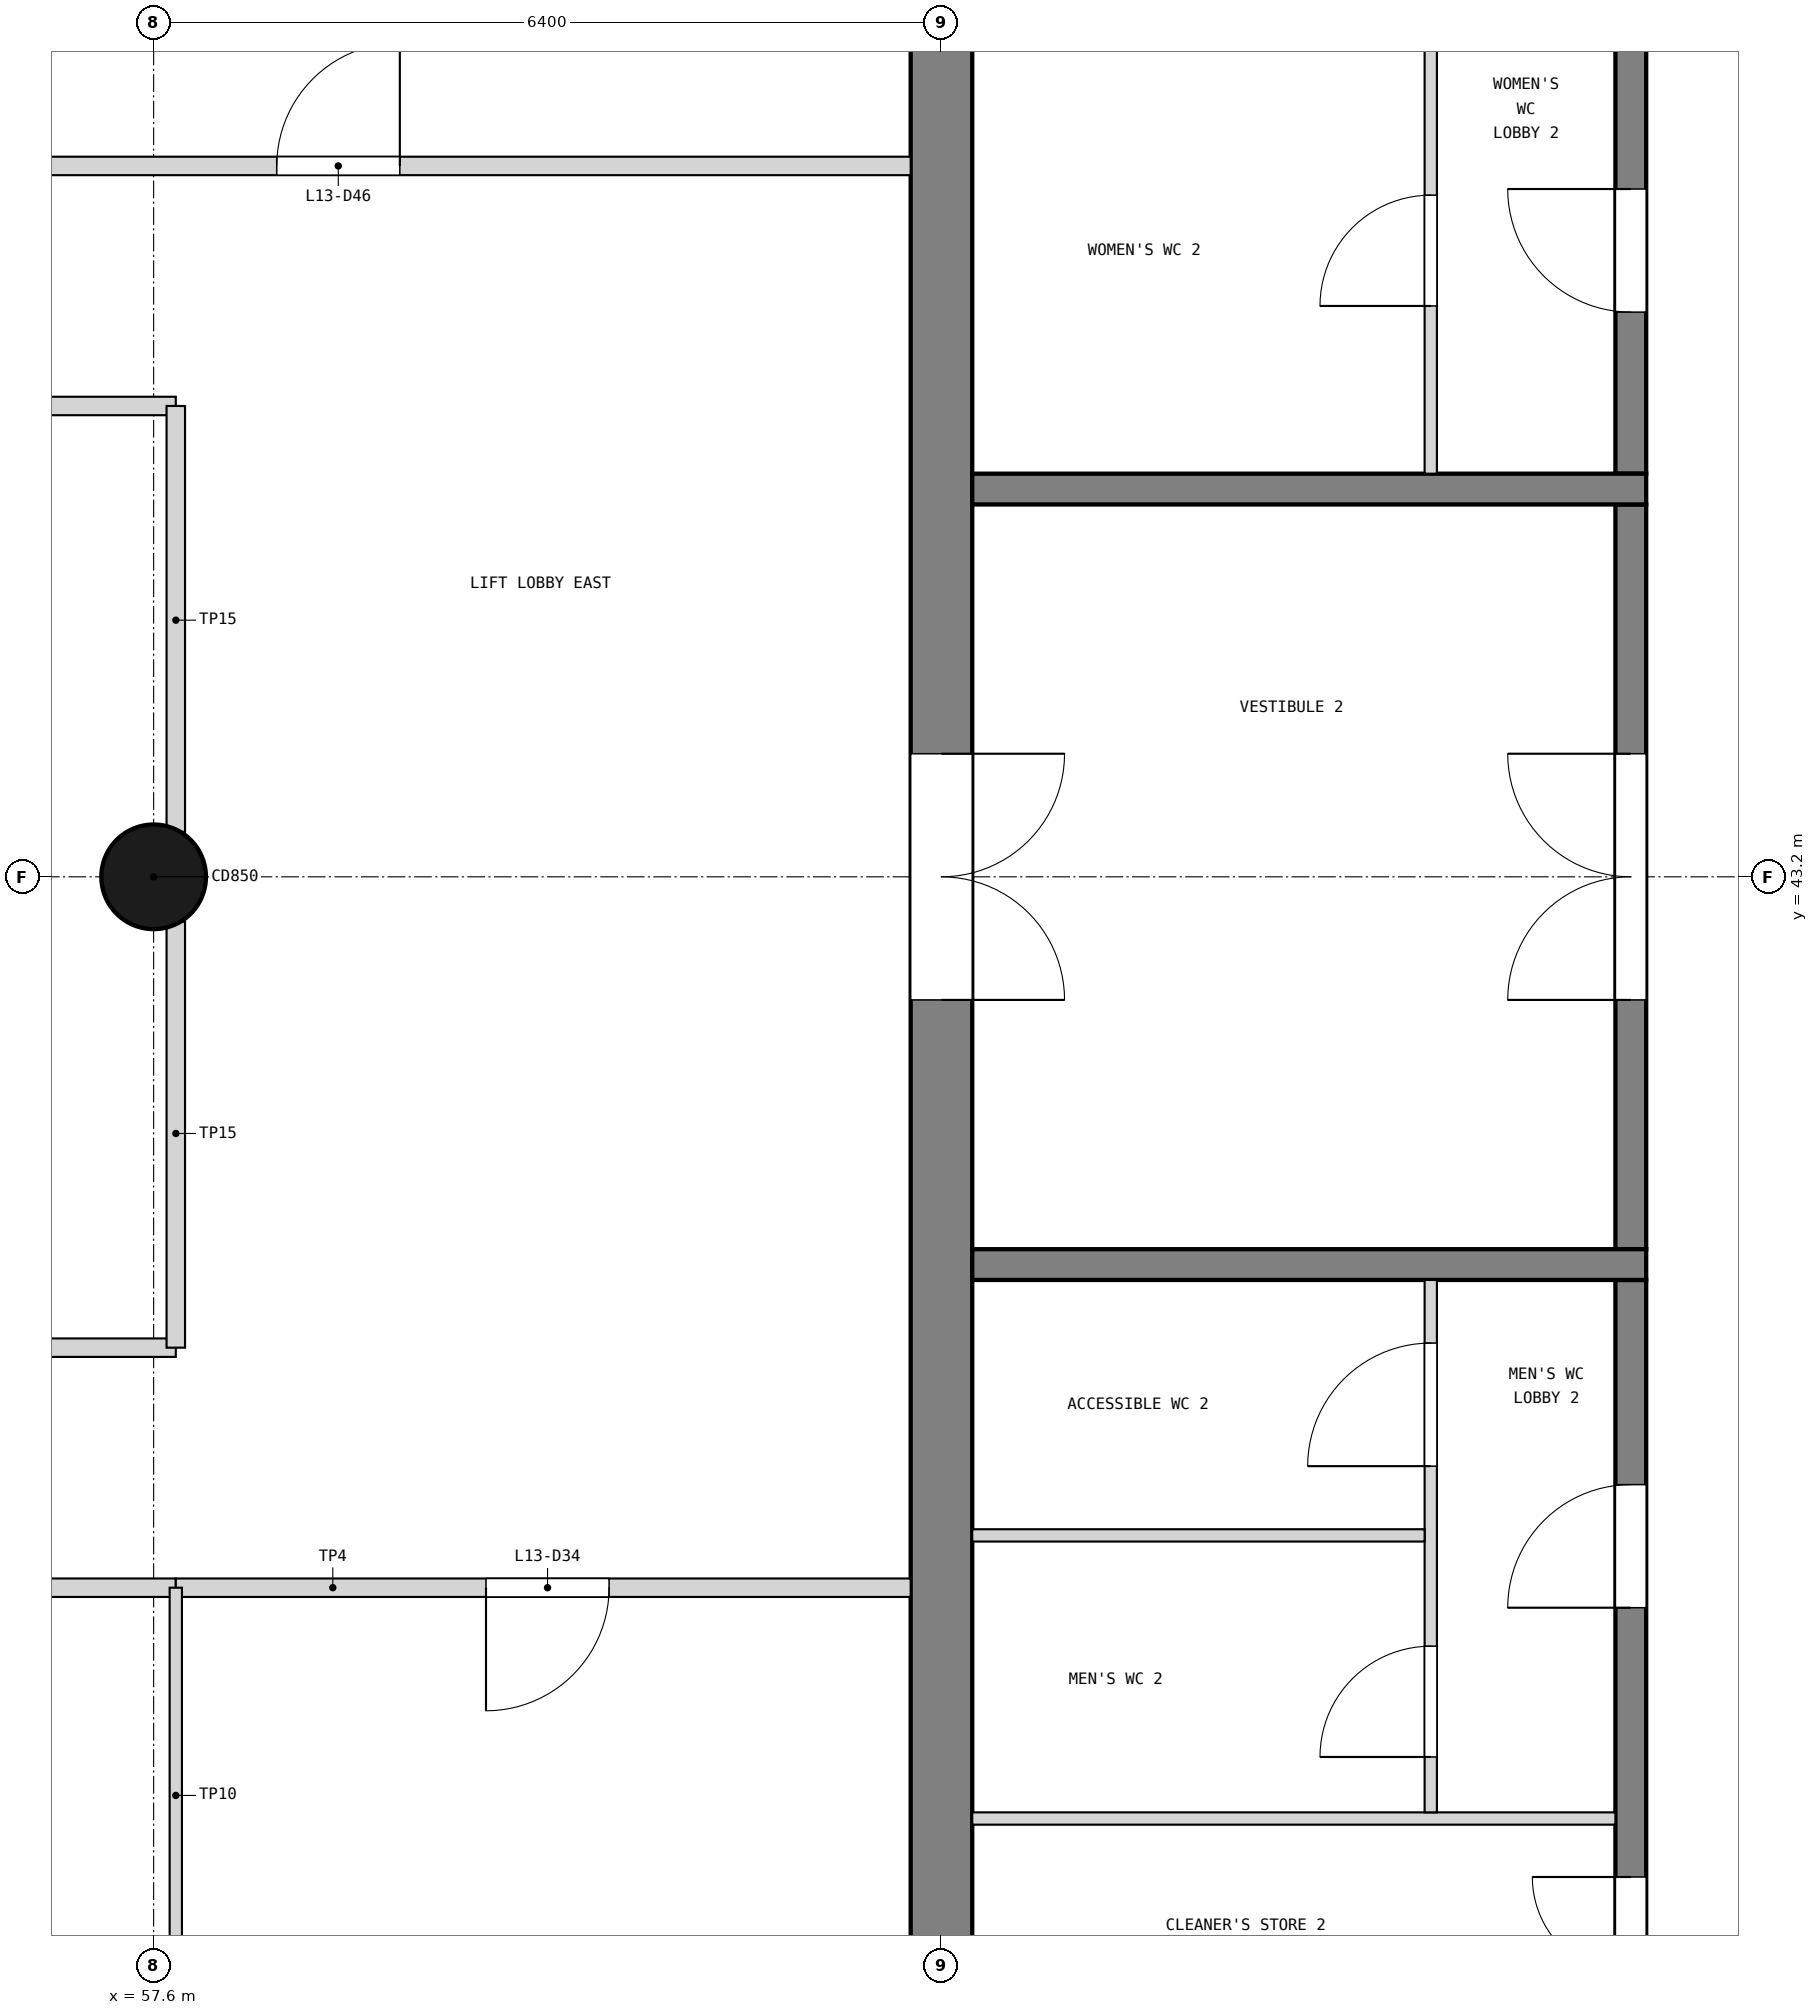
"""IFC4 building model, lengths in metres.
Left out: names, types, materials, properties, quantities, classifications, styles, units other than length and angle.
Written with IfcOpenShell. Run it as: python <this file> out.ifc"""

import sys

from ifc_helpers import new_model, si_unit, direction, frame, frame_2d, origin, origin_2d, place, context, subcontext, project, spatial, rectangle, circle, extrude, element, fill, save


model = new_model("IFC4")
c1 = context("Model", 3, precision=1e-05, world=origin(), true_north=direction((0.0, 1.0)))
c2 = subcontext(c1, "Body", "Model", "MODEL_VIEW")
j1 = project(units=[si_unit("LENGTHUNIT", "METRE"), si_unit("PLANEANGLEUNIT", "RADIAN")], contexts=[c1])
p1 = place(None, origin())
s1 = spatial("IfcSite", under=j1, at=p1, CompositionType="ELEMENT")
p2 = place(p1, origin())
s2 = spatial("IfcBuilding", under=s1, at=p2, CompositionType="ELEMENT")
p3 = place(p2, frame((0.0, 0.0, 52.2)))
s3 = spatial("IfcBuildingStorey", under=s2, at=p3, CompositionType="ELEMENT", Elevation=52.2)
p4 = place(p3, frame((64.0, 33.85, 0.0), z_axis=(0.0, 0.0, 1.0), x_axis=(0.0, 1.0, 0.0)))
e1 = element("IfcWall", 1, at=p4, inside=s3, PredefinedType="SHEAR", context=c2, shape_type="SweptSolid", body=[
    extrude(rectangle(XDim=18.7, YDim=0.5, at=frame_2d((9.35, 0.0))), origin(), (0.0, 0.0, 1.0), 3.9),
])
p5 = place(p4, frame((8.35, 0.0, 0.0)))
e2 = element("IfcOpeningElement", 2, at=p5, cuts=e1, PredefinedType="OPENING", context=c2, shape_type="SweptSolid", body=[
    extrude(rectangle(XDim=2.0, YDim=2.1, at=frame_2d((1.0, 1.05))), frame((0.0, 0.26, 0.0), z_axis=(0.0, -1.0, 0.0), x_axis=(1.0, 0.0, 0.0)), (0.0, 0.0, 1.0), 0.52),
])
p6 = place(p3, frame((57.6, 43.2, 0.0), z_axis=(0.0, 0.0, 1.0), x_axis=(1.0, 0.0, 0.0)))
e3 = element("IfcColumn", 3, at=p6, inside=s3, PredefinedType="COLUMN", context=c2, shape_type="SweptSolid", body=[
    extrude(circle(Radius=0.425, at=origin_2d()), origin(), (0.0, 0.0, 1.0), 3.9),
])
p7 = place(p3, frame((69.6, 33.85, 0.0), z_axis=(0.0, 0.0, 1.0), x_axis=(0.0, 1.0, 0.0)))
e4 = element("IfcWall", 4, at=p7, inside=s3, PredefinedType="SOLIDWALL", context=c2, shape_type="SweptSolid", body=[
    extrude(rectangle(XDim=6.075, YDim=0.25, at=frame_2d((3.038, 0.0))), origin(), (0.0, 0.0, 1.0), 3.6),
])
p8 = place(p7, frame((0.425, 0.0, 0.0)))
e5 = element("IfcOpeningElement", 5, at=p8, cuts=e4, PredefinedType="OPENING", context=c2, shape_type="SweptSolid", body=[
    extrude(rectangle(XDim=0.8, YDim=2.1, at=frame_2d((0.4, 1.05))), frame((0.0, 0.135, 0.0), z_axis=(0.0, -1.0, 0.0), x_axis=(1.0, 0.0, 0.0)), (0.0, 0.0, 1.0), 0.27),
])
p9 = place(p7, frame((3.413, 0.0, 0.0)))
e6 = element("IfcOpeningElement", 6, at=p9, cuts=e4, PredefinedType="OPENING", context=c2, shape_type="SweptSolid", body=[
    extrude(rectangle(XDim=1.0, YDim=2.1, at=frame_2d((0.5, 1.05))), frame((0.0, 0.135, 0.0), z_axis=(0.0, -1.0, 0.0), x_axis=(1.0, 0.0, 0.0)), (0.0, 0.0, 1.0), 0.27),
])
p10 = place(p3, frame((69.6, 40.175, 0.0), z_axis=(0.0, 0.0, 1.0), x_axis=(0.0, 1.0, 0.0)))
e7 = element("IfcWall", 7, at=p10, inside=s3, PredefinedType="SOLIDWALL", context=c2, shape_type="SweptSolid", body=[
    extrude(rectangle(XDim=6.05, YDim=0.25, at=frame_2d((3.025, 0.0))), origin(), (0.0, 0.0, 1.0), 3.6),
])
p11 = place(p10, frame((2.025, 0.0, 0.0)))
e8 = element("IfcOpeningElement", 8, at=p11, cuts=e7, PredefinedType="OPENING", context=c2, shape_type="SweptSolid", body=[
    extrude(rectangle(XDim=2.0, YDim=2.1, at=frame_2d((1.0, 1.05))), frame((0.0, 0.135, 0.0), z_axis=(0.0, -1.0, 0.0), x_axis=(1.0, 0.0, 0.0)), (0.0, 0.0, 1.0), 0.27),
])
p12 = place(p3, frame((69.6, 46.475, 0.0), z_axis=(0.0, 0.0, 1.0), x_axis=(0.0, 1.0, 0.0)))
e9 = element("IfcWall", 9, at=p12, inside=s3, PredefinedType="SOLIDWALL", context=c2, shape_type="SweptSolid", body=[
    extrude(rectangle(XDim=6.075, YDim=0.25, at=frame_2d((3.038, 0.0))), origin(), (0.0, 0.0, 1.0), 3.6),
])
p13 = place(p12, frame((1.312, 0.0, 0.0)))
e10 = element("IfcOpeningElement", 10, at=p13, cuts=e9, PredefinedType="OPENING", context=c2, shape_type="SweptSolid", body=[
    extrude(rectangle(XDim=1.0, YDim=2.1, at=frame_2d((0.5, 1.05))), frame((0.0, 0.135, 0.0), z_axis=(0.0, -1.0, 0.0), x_axis=(1.0, 0.0, 0.0)), (0.0, 0.0, 1.0), 0.27),
])
p14 = place(p12, frame((4.45, 0.0, 0.0)))
e11 = element("IfcOpeningElement", 11, at=p14, cuts=e9, PredefinedType="OPENING", context=c2, shape_type="SweptSolid", body=[
    extrude(rectangle(XDim=0.9, YDim=2.1, at=frame_2d((0.45, 1.05))), frame((0.0, 0.135, 0.0), z_axis=(0.0, -1.0, 0.0), x_axis=(1.0, 0.0, 0.0)), (0.0, 0.0, 1.0), 0.27),
])
for number, where, z_axis, x_axis in (
    (12, (69.725, 40.05, 0.0), (0.0, 0.0, 1.0), (-1.0, 0.0, 0.0)),
    (13, (69.725, 46.35, 0.0), (0.0, 0.0, 1.0), (-1.0, 0.0, 0.0)),
):
    element("IfcWall", number, at=place(p3, frame(where, z_axis=z_axis, x_axis=x_axis)), inside=s3, PredefinedType="SOLIDWALL", context=c2, shape_type="SweptSolid", body=[
        extrude(rectangle(XDim=5.475, YDim=0.25, at=frame_2d((2.738, 0.0))), origin(), (0.0, 0.0, 1.0), 3.6),
    ])
p15 = place(p3, frame((69.475, 35.55, 0.0), z_axis=(0.0, 0.0, 1.0), x_axis=(-1.0, 0.0, 0.0)))
e14 = element("IfcWall", 14, at=p15, inside=s3, PredefinedType="PARTITIONING", context=c2, shape_type="SweptSolid", body=[
    extrude(rectangle(XDim=5.225, YDim=0.1, at=frame_2d((2.613, 0.0))), origin(), (0.0, 0.0, 1.0), 3.6),
])
p16 = place(p3, frame((67.975, 35.6, 0.0), z_axis=(0.0, 0.0, 1.0), x_axis=(0.0, 1.0, 0.0)))
e15 = element("IfcWall", 15, at=p16, inside=s3, PredefinedType="PARTITIONING", context=c2, shape_type="SweptSolid", body=[
    extrude(rectangle(XDim=4.325, YDim=0.1, at=frame_2d((2.163, 0.0))), origin(), (0.0, 0.0, 1.0), 3.6),
])
p17 = place(p16, frame((0.45, 0.0, 0.0)))
e16 = element("IfcOpeningElement", 16, at=p17, cuts=e15, PredefinedType="OPENING", context=c2, shape_type="SweptSolid", body=[
    extrude(rectangle(XDim=0.9, YDim=2.1, at=frame_2d((0.45, 1.05))), frame((0.0, 0.06, 0.0), z_axis=(0.0, -1.0, 0.0), x_axis=(1.0, 0.0, 0.0)), (0.0, 0.0, 1.0), 0.12),
])
p18 = place(p16, frame((2.812, 0.0, 0.0)))
e17 = element("IfcOpeningElement", 17, at=p18, cuts=e15, PredefinedType="OPENING", context=c2, shape_type="SweptSolid", body=[
    extrude(rectangle(XDim=1.0, YDim=2.1, at=frame_2d((0.5, 1.05))), frame((0.0, 0.06, 0.0), z_axis=(0.0, -1.0, 0.0), x_axis=(1.0, 0.0, 0.0)), (0.0, 0.0, 1.0), 0.12),
])
p19 = place(p3, frame((67.925, 37.85, 0.0), z_axis=(0.0, 0.0, 1.0), x_axis=(-1.0, 0.0, 0.0)))
e18 = element("IfcWall", 18, at=p19, inside=s3, PredefinedType="PARTITIONING", context=c2, shape_type="SweptSolid", body=[
    extrude(rectangle(XDim=3.675, YDim=0.1, at=frame_2d((1.837, 0.0))), origin(), (0.0, 0.0, 1.0), 3.6),
])
p20 = place(p3, frame((67.975, 46.475, 0.0), z_axis=(0.0, 0.0, 1.0), x_axis=(0.0, 1.0, 0.0)))
e19 = element("IfcWall", 19, at=p20, inside=s3, PredefinedType="PARTITIONING", context=c2, shape_type="SweptSolid", body=[
    extrude(rectangle(XDim=3.625, YDim=0.1, at=frame_2d((1.812, 0.0))), origin(), (0.0, 0.0, 1.0), 3.6),
])
p21 = place(p20, frame((1.363, 0.0, 0.0)))
e20 = element("IfcOpeningElement", 20, at=p21, cuts=e19, PredefinedType="OPENING", context=c2, shape_type="SweptSolid", body=[
    extrude(rectangle(XDim=0.9, YDim=2.1, at=frame_2d((0.45, 1.05))), frame((0.0, 0.06, 0.0), z_axis=(0.0, -1.0, 0.0), x_axis=(1.0, 0.0, 0.0)), (0.0, 0.0, 1.0), 0.12),
])
p22 = place(p3, frame((51.38, 37.425, 0.0), z_axis=(0.0, 0.0, 1.0), x_axis=(1.0, 0.0, 0.0)))
e21 = element("IfcWall", 21, at=p22, inside=s3, PredefinedType="PARTITIONING", context=c2, shape_type="SweptSolid", body=[
    extrude(rectangle(XDim=6.4, YDim=0.15, at=frame_2d((3.2, 0.0))), origin(), (0.0, 0.0, 1.0), 3.68),
])
p23 = place(p22, frame((2.72, 0.0, 0.0)))
e22 = element("IfcOpeningElement", 22, at=p23, cuts=e21, PredefinedType="OPENING", context=c2, shape_type="SweptSolid", body=[
    extrude(rectangle(XDim=1.0, YDim=2.1, at=frame_2d((0.5, 1.05))), frame((0.0, 0.085, 0.0), z_axis=(0.0, -1.0, 0.0), x_axis=(1.0, 0.0, 0.0)), (0.0, 0.0, 1.0), 0.17),
])
p24 = place(p3, frame((57.78, 37.425, 0.0), z_axis=(0.0, 0.0, 1.0), x_axis=(1.0, 0.0, 0.0)))
e23 = element("IfcWall", 23, at=p24, inside=s3, PredefinedType="PARTITIONING", context=c2, shape_type="SweptSolid", body=[
    extrude(rectangle(XDim=5.97, YDim=0.15, at=frame_2d((2.985, 0.0))), origin(), (0.0, 0.0, 1.0), 3.68),
])
p25 = place(p24, frame((2.52, 0.0, 0.0)))
e24 = element("IfcOpeningElement", 24, at=p25, cuts=e23, PredefinedType="OPENING", context=c2, shape_type="SweptSolid", body=[
    extrude(rectangle(XDim=1.0, YDim=2.1, at=frame_2d((0.5, 1.05))), frame((0.0, 0.085, 0.0), z_axis=(0.0, -1.0, 0.0), x_axis=(1.0, 0.0, 0.0)), (0.0, 0.0, 1.0), 0.17),
])
p26 = place(p3, frame((57.78, 34.105, 0.0), z_axis=(0.0, 0.0, 1.0), x_axis=(0.0, 1.0, 0.0)))
e25 = element("IfcWall", 25, at=p26, inside=s3, PredefinedType="PARTITIONING", context=c2, shape_type="SweptSolid", body=[
    extrude(rectangle(XDim=3.32, YDim=0.1, at=frame_2d((1.66, 0.0))), origin(), (0.0, 0.0, 1.0), 2.78),
])
p27 = place(p3, frame((51.38, 39.375, 0.0), z_axis=(0.0, 0.0, 1.0), x_axis=(1.0, 0.0, 0.0)))
e26 = element("IfcWall", 26, at=p27, inside=s3, PredefinedType="PARTITIONING", context=c2, shape_type="SweptSolid", body=[
    extrude(rectangle(XDim=6.4, YDim=0.15, at=frame_2d((3.2, 0.0))), origin(), (0.0, 0.0, 1.0), 3.68),
])
p28 = place(p27, frame((2.67, 0.0, 0.0)))
e27 = element("IfcOpeningElement", 27, at=p28, cuts=e26, PredefinedType="OPENING", context=c2, shape_type="SweptSolid", body=[
    extrude(rectangle(XDim=1.0, YDim=2.1, at=frame_2d((0.5, 1.05))), frame((0.0, 0.085, 0.0), z_axis=(0.0, -1.0, 0.0), x_axis=(1.0, 0.0, 0.0)), (0.0, 0.0, 1.0), 0.17),
])
p29 = place(p3, frame((51.38, 47.025, 0.0), z_axis=(0.0, 0.0, 1.0), x_axis=(1.0, 0.0, 0.0)))
e28 = element("IfcWall", 28, at=p29, inside=s3, PredefinedType="PARTITIONING", context=c2, shape_type="SweptSolid", body=[
    extrude(rectangle(XDim=6.4, YDim=0.15, at=frame_2d((3.2, 0.0))), origin(), (0.0, 0.0, 1.0), 3.68),
])
p30 = place(p3, frame((54.4, 48.975, 0.0), z_axis=(0.0, 0.0, 1.0), x_axis=(1.0, 0.0, 0.0)))
e29 = element("IfcWall", 29, at=p30, inside=s3, PredefinedType="PARTITIONING", context=c2, shape_type="SweptSolid", body=[
    extrude(rectangle(XDim=9.35, YDim=0.15, at=frame_2d((4.675, 0.0))), origin(), (0.0, 0.0, 1.0), 3.68),
])
p31 = place(p30, frame((4.2, 0.0, 0.0)))
e30 = element("IfcOpeningElement", 30, at=p31, cuts=e29, PredefinedType="OPENING", context=c2, shape_type="SweptSolid", body=[
    extrude(rectangle(XDim=1.0, YDim=2.1, at=frame_2d((0.5, 1.05))), frame((0.0, 0.085, 0.0), z_axis=(0.0, -1.0, 0.0), x_axis=(1.0, 0.0, 0.0)), (0.0, 0.0, 1.0), 0.17),
])
for number, where, z_axis, x_axis in (
    (31, (57.78, 39.375, 0.0), (0.0, 0.0, 1.0), (0.0, 1.0, 0.0)),
    (32, (57.78, 43.565, 0.0), (0.0, 0.0, 1.0), (0.0, 1.0, 0.0)),
):
    element("IfcWall", number, at=place(p3, frame(where, z_axis=z_axis, x_axis=x_axis)), inside=s3, PredefinedType="PARTITIONING", context=c2, shape_type="SweptSolid", body=[
        extrude(rectangle(XDim=3.46, YDim=0.15, at=frame_2d((1.73, 0.0))), origin(), (0.0, 0.0, 1.0), 2.78),
    ])
p32 = place(p11, origin())
e33 = element("IfcDoor", 33, at=p32, inside=s3, OperationType="DOUBLE_DOOR_SINGLE_SWING", PredefinedType="DOOR", context=c2, shape_type="SweptSolid", body=[
    extrude(rectangle(XDim=2.0, YDim=2.1, at=frame_2d((1.0, 1.05))), frame((0.0, 0.025, 0.0), z_axis=(0.0, -1.0, 0.0), x_axis=(1.0, 0.0, 0.0)), (0.0, 0.0, 1.0), 0.05),
])
fill(e8, e33)
p33 = place(p5, frame((2.0, 0.0, 0.0), z_axis=(0.0, 0.0, 1.0), x_axis=(-1.0, 0.0, 0.0)))
e34 = element("IfcDoor", 34, at=p33, inside=s3, OperationType="DOUBLE_DOOR_SINGLE_SWING", PredefinedType="DOOR", context=c2, shape_type="SweptSolid", body=[
    extrude(rectangle(XDim=2.0, YDim=2.1, at=frame_2d((1.0, 1.05))), frame((0.0, 0.025, 0.0), z_axis=(0.0, -1.0, 0.0), x_axis=(1.0, 0.0, 0.0)), (0.0, 0.0, 1.0), 0.05),
])
fill(e2, e34)
p34 = place(p8, origin())
e35 = element("IfcDoor", 35, at=p34, inside=s3, OperationType="SINGLE_SWING_RIGHT", PredefinedType="DOOR", context=c2, shape_type="SweptSolid", body=[
    extrude(rectangle(XDim=0.8, YDim=2.1, at=frame_2d((0.4, 1.05))), frame((0.0, 0.025, 0.0), z_axis=(0.0, -1.0, 0.0), x_axis=(1.0, 0.0, 0.0)), (0.0, 0.0, 1.0), 0.05),
])
fill(e5, e35)
p35 = place(p9, origin())
e36 = element("IfcDoor", 36, at=p35, inside=s3, OperationType="SINGLE_SWING_LEFT", PredefinedType="DOOR", context=c2, shape_type="SweptSolid", body=[
    extrude(rectangle(XDim=1.0, YDim=2.1, at=frame_2d((0.5, 1.05))), frame((0.0, 0.025, 0.0), z_axis=(0.0, -1.0, 0.0), x_axis=(1.0, 0.0, 0.0)), (0.0, 0.0, 1.0), 0.05),
])
fill(e6, e36)
p36 = place(p17, origin())
e37 = element("IfcDoor", 37, at=p36, inside=s3, OperationType="SINGLE_SWING_LEFT", PredefinedType="DOOR", context=c2, shape_type="SweptSolid", body=[
    extrude(rectangle(XDim=0.9, YDim=2.1, at=frame_2d((0.45, 1.05))), frame((0.0, 0.025, 0.0), z_axis=(0.0, -1.0, 0.0), x_axis=(1.0, 0.0, 0.0)), (0.0, 0.0, 1.0), 0.05),
])
fill(e16, e37)
p37 = place(p18, origin())
e38 = element("IfcDoor", 38, at=p37, inside=s3, OperationType="SINGLE_SWING_LEFT", PredefinedType="DOOR", context=c2, shape_type="SweptSolid", body=[
    extrude(rectangle(XDim=1.0, YDim=2.1, at=frame_2d((0.5, 1.05))), frame((0.0, 0.025, 0.0), z_axis=(0.0, -1.0, 0.0), x_axis=(1.0, 0.0, 0.0)), (0.0, 0.0, 1.0), 0.05),
])
fill(e17, e38)
p38 = place(p13, origin())
e39 = element("IfcDoor", 39, at=p38, inside=s3, OperationType="SINGLE_SWING_RIGHT", PredefinedType="DOOR", context=c2, shape_type="SweptSolid", body=[
    extrude(rectangle(XDim=1.0, YDim=2.1, at=frame_2d((0.5, 1.05))), frame((0.0, 0.025, 0.0), z_axis=(0.0, -1.0, 0.0), x_axis=(1.0, 0.0, 0.0)), (0.0, 0.0, 1.0), 0.05),
])
fill(e10, e39)
p39 = place(p21, origin())
e40 = element("IfcDoor", 40, at=p39, inside=s3, OperationType="SINGLE_SWING_LEFT", PredefinedType="DOOR", context=c2, shape_type="SweptSolid", body=[
    extrude(rectangle(XDim=0.9, YDim=2.1, at=frame_2d((0.45, 1.05))), frame((0.0, 0.025, 0.0), z_axis=(0.0, -1.0, 0.0), x_axis=(1.0, 0.0, 0.0)), (0.0, 0.0, 1.0), 0.05),
])
fill(e20, e40)
p40 = place(p25, frame((1.0, 0.0, 0.0), z_axis=(0.0, 0.0, 1.0), x_axis=(-1.0, 0.0, 0.0)))
e41 = element("IfcDoor", 41, at=p40, inside=s3, OperationType="SINGLE_SWING_RIGHT", PredefinedType="DOOR", context=c2, shape_type="SweptSolid", body=[
    extrude(rectangle(XDim=1.0, YDim=2.1, at=frame_2d((0.5, 1.05))), frame((0.0, 0.025, 0.0), z_axis=(0.0, -1.0, 0.0), x_axis=(1.0, 0.0, 0.0)), (0.0, 0.0, 1.0), 0.05),
])
fill(e24, e41)
p41 = place(p31, origin())
e42 = element("IfcDoor", 42, at=p41, inside=s3, OperationType="SINGLE_SWING_RIGHT", PredefinedType="DOOR", context=c2, shape_type="SweptSolid", body=[
    extrude(rectangle(XDim=1.0, YDim=2.1, at=frame_2d((0.5, 1.05))), frame((0.0, 0.025, 0.0), z_axis=(0.0, -1.0, 0.0), x_axis=(1.0, 0.0, 0.0)), (0.0, 0.0, 1.0), 0.05),
])
fill(e30, e42)
save(model, sys.argv[1])
